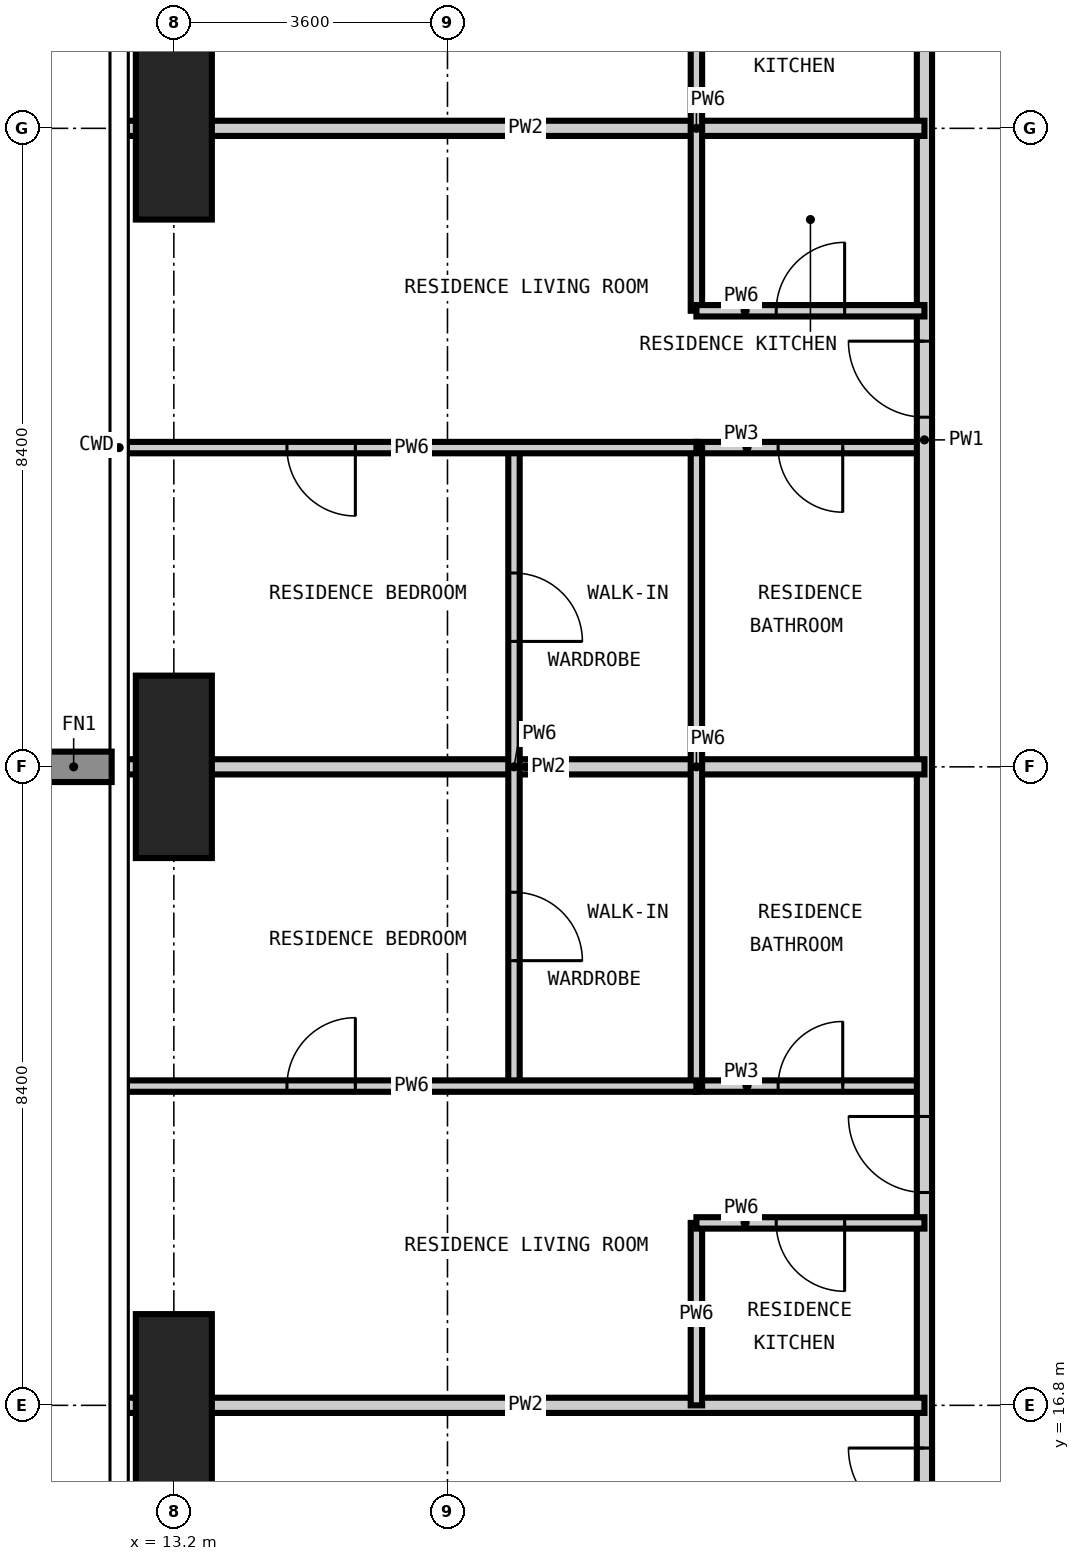
"""IFC4 building model, lengths in metres.
Left out: names, types, materials, properties, quantities, classifications, styles, units other than length and angle.
Written with IfcOpenShell. Run it as: python <this file> out.ifc"""

import sys

from ifc_helpers import new_model, si_unit, direction, frame, frame_2d, origin, origin_2d, place, context, subcontext, project, spatial, rectangle, extrude, element, fill, save


model = new_model("IFC4")
c1 = context("Model", 3, precision=1e-05, world=origin(), true_north=direction((0.0, 1.0)))
c2 = subcontext(c1, "Body", "Model", "MODEL_VIEW")
j1 = project(units=[si_unit("LENGTHUNIT", "METRE"), si_unit("PLANEANGLEUNIT", "RADIAN")], contexts=[c1])
p1 = place(None, origin())
s1 = spatial("IfcSite", under=j1, at=p1, CompositionType="ELEMENT")
p2 = place(p1, origin())
s2 = spatial("IfcBuilding", under=s1, at=p2, CompositionType="ELEMENT")
p3 = place(p2, frame((0.0, 0.0, 252.9)))
s3 = spatial("IfcBuildingStorey", under=s2, at=p3, CompositionType="ELEMENT", Elevation=252.9)
for number, where, z_axis, x_axis in (
    (1, (13.2, 16.8, -0.35), (0.0, 0.0, 1.0), (1.0, 0.0, 0.0)),
    (2, (13.2, 25.2, -0.35), (0.0, 0.0, 1.0), (1.0, 0.0, 0.0)),
    (3, (13.2, 33.6, -0.35), (0.0, 0.0, 1.0), (1.0, 0.0, 0.0)),
):
    element("IfcColumn", number, at=place(p3, frame(where, z_axis=z_axis, x_axis=x_axis)), inside=s3, PredefinedType="COLUMN", context=c2, shape_type="SweptSolid", body=[
        extrude(rectangle(XDim=1.0, YDim=2.4, at=origin_2d()), origin(), (0.0, 0.0, 1.0), 3.9),
    ])
p4 = place(p3, frame((20.075, 21.0, 0.0), z_axis=(0.0, 0.0, 1.0), x_axis=(1.0, 0.0, 0.0)))
e4 = element("IfcWall", 4, at=p4, inside=s3, PredefinedType="PARTITIONING", context=c2, shape_type="SweptSolid", body=[
    extrude(rectangle(XDim=3.0, YDim=0.15, at=frame_2d((1.5, 0.0))), origin(), (0.0, 0.0, 1.0), 3.55),
])
p5 = place(p4, frame((1.075, 0.0, 0.0)))
e5 = element("IfcOpeningElement", 5, at=p5, cuts=e4, PredefinedType="OPENING", context=c2, shape_type="SweptSolid", body=[
    extrude(rectangle(XDim=0.85, YDim=2.1, at=frame_2d((0.425, 1.05))), frame((0.0, 0.085, 0.0), z_axis=(0.0, -1.0, 0.0), x_axis=(1.0, 0.0, 0.0)), (0.0, 0.0, 1.0), 0.17),
])
p6 = place(p3, frame((20.075, 29.4, 0.0), z_axis=(0.0, 0.0, 1.0), x_axis=(1.0, 0.0, 0.0)))
e6 = element("IfcWall", 6, at=p6, inside=s3, PredefinedType="PARTITIONING", context=c2, shape_type="SweptSolid", body=[
    extrude(rectangle(XDim=3.0, YDim=0.15, at=frame_2d((1.5, 0.0))), origin(), (0.0, 0.0, 1.0), 3.55),
])
p7 = place(p6, frame((1.075, 0.0, 0.0)))
e7 = element("IfcOpeningElement", 7, at=p7, cuts=e6, PredefinedType="OPENING", context=c2, shape_type="SweptSolid", body=[
    extrude(rectangle(XDim=0.85, YDim=2.1, at=frame_2d((0.425, 1.05))), frame((0.0, 0.085, 0.0), z_axis=(0.0, -1.0, 0.0), x_axis=(1.0, 0.0, 0.0)), (0.0, 0.0, 1.0), 0.17),
])
p8 = place(p3, frame((23.075, 14.675, 0.0), z_axis=(0.0, 0.0, 1.0), x_axis=(0.0, 1.0, 0.0)))
e8 = element("IfcWall", 8, at=p8, inside=s3, PredefinedType="PARTITIONING", context=c2, shape_type="SweptSolid", body=[
    extrude(rectangle(XDim=30.65, YDim=0.2, at=frame_2d((15.325, 0.0))), origin(), (0.0, 0.0, 1.0), 3.55),
])
p9 = place(p8, frame((4.925, 0.0, 0.0)))
e9 = element("IfcOpeningElement", 9, at=p9, cuts=e8, PredefinedType="OPENING", context=c2, shape_type="SweptSolid", body=[
    extrude(rectangle(XDim=1.0, YDim=2.2, at=frame_2d((0.5, 1.1))), frame((0.0, 0.11, 0.0), z_axis=(0.0, -1.0, 0.0), x_axis=(1.0, 0.0, 0.0)), (0.0, 0.0, 1.0), 0.22),
])
p10 = place(p8, frame((15.125, 0.0, 0.0)))
e10 = element("IfcOpeningElement", 10, at=p10, cuts=e8, PredefinedType="OPENING", context=c2, shape_type="SweptSolid", body=[
    extrude(rectangle(XDim=1.0, YDim=2.2, at=frame_2d((0.5, 1.1))), frame((0.0, 0.11, 0.0), z_axis=(0.0, -1.0, 0.0), x_axis=(1.0, 0.0, 0.0)), (0.0, 0.0, 1.0), 0.22),
])
p11 = place(p8, frame((21.725, 0.0, 0.0)))
e11 = element("IfcOpeningElement", 11, at=p11, cuts=e8, PredefinedType="OPENING", context=c2, shape_type="SweptSolid", body=[
    extrude(rectangle(XDim=1.0, YDim=2.2, at=frame_2d((0.5, 1.1))), frame((0.0, 0.11, 0.0), z_axis=(0.0, -1.0, 0.0), x_axis=(1.0, 0.0, 0.0)), (0.0, 0.0, 1.0), 0.22),
])
p12 = place(p8, frame((0.563, 0.0, 0.0)))
e12 = element("IfcOpeningElement", 12, at=p12, cuts=e8, PredefinedType="OPENING", context=c2, shape_type="SweptSolid", body=[
    extrude(rectangle(XDim=1.0, YDim=2.2, at=frame_2d((0.5, 1.1))), frame((0.0, 0.11, 0.0), z_axis=(0.0, -1.0, 0.0), x_axis=(1.0, 0.0, 0.0)), (0.0, 0.0, 1.0), 0.22),
])
p13 = place(p8, frame((28.488, 0.0, 0.0)))
e13 = element("IfcOpeningElement", 13, at=p13, cuts=e8, PredefinedType="OPENING", context=c2, shape_type="SweptSolid", body=[
    extrude(rectangle(XDim=1.0, YDim=2.2, at=frame_2d((0.5, 1.1))), frame((0.0, 0.11, 0.0), z_axis=(0.0, -1.0, 0.0), x_axis=(1.0, 0.0, 0.0)), (0.0, 0.0, 1.0), 0.22),
])
for number, where, z_axis, x_axis in (
    (14, (12.582, 16.8, 0.0), (0.0, 0.0, 1.0), (1.0, 0.0, 0.0)),
    (15, (12.582, 25.2, 0.0), (0.0, 0.0, 1.0), (1.0, 0.0, 0.0)),
    (16, (12.582, 33.6, 0.0), (0.0, 0.0, 1.0), (1.0, 0.0, 0.0)),
):
    element("IfcWall", number, at=place(p3, frame(where, z_axis=z_axis, x_axis=x_axis)), inside=s3, PredefinedType="PARTITIONING", context=c2, shape_type="SweptSolid", body=[
        extrude(rectangle(XDim=10.493, YDim=0.2, at=frame_2d((5.247, 0.0))), origin(), (0.0, 0.0, 1.0), 3.55),
    ])
p14 = place(p3, frame((17.675, 21.0, 0.0), z_axis=(0.0, 0.0, 1.0), x_axis=(0.0, 1.0, 0.0)))
e17 = element("IfcWall", 17, at=p14, inside=s3, PredefinedType="PARTITIONING", context=c2, shape_type="SweptSolid", body=[
    extrude(rectangle(XDim=8.4, YDim=0.15, at=frame_2d((4.2, 0.0))), origin(), (0.0, 0.0, 1.0), 3.55),
])
p15 = place(p14, frame((1.65, 0.0, 0.0)))
e18 = element("IfcOpeningElement", 18, at=p15, cuts=e17, PredefinedType="OPENING", context=c2, shape_type="SweptSolid", body=[
    extrude(rectangle(XDim=0.9, YDim=2.1, at=frame_2d((0.45, 1.05))), frame((0.0, 0.085, 0.0), z_axis=(0.0, -1.0, 0.0), x_axis=(1.0, 0.0, 0.0)), (0.0, 0.0, 1.0), 0.17),
])
p16 = place(p14, frame((5.85, 0.0, 0.0)))
e19 = element("IfcOpeningElement", 19, at=p16, cuts=e17, PredefinedType="OPENING", context=c2, shape_type="SweptSolid", body=[
    extrude(rectangle(XDim=0.9, YDim=2.1, at=frame_2d((0.45, 1.05))), frame((0.0, 0.085, 0.0), z_axis=(0.0, -1.0, 0.0), x_axis=(1.0, 0.0, 0.0)), (0.0, 0.0, 1.0), 0.17),
])
p17 = place(p3, frame((20.075, 16.8, 0.0), z_axis=(0.0, 0.0, 1.0), x_axis=(0.0, 1.0, 0.0)))
e20 = element("IfcWall", 20, at=p17, inside=s3, PredefinedType="PARTITIONING", context=c2, shape_type="SweptSolid", body=[
    extrude(rectangle(XDim=2.4, YDim=0.15, at=frame_2d((1.2, 0.0))), origin(), (0.0, 0.0, 1.0), 3.55),
])
p18 = place(p3, frame((20.075, 21.0, 0.0), z_axis=(0.0, 0.0, 1.0), x_axis=(0.0, 1.0, 0.0)))
e21 = element("IfcWall", 21, at=p18, inside=s3, PredefinedType="PARTITIONING", context=c2, shape_type="SweptSolid", body=[
    extrude(rectangle(XDim=8.4, YDim=0.15, at=frame_2d((4.2, 0.0))), origin(), (0.0, 0.0, 1.0), 3.55),
])
p19 = place(p3, frame((20.075, 31.2, 0.0), z_axis=(0.0, 0.0, 1.0), x_axis=(0.0, 1.0, 0.0)))
e22 = element("IfcWall", 22, at=p19, inside=s3, PredefinedType="PARTITIONING", context=c2, shape_type="SweptSolid", body=[
    extrude(rectangle(XDim=4.8, YDim=0.15, at=frame_2d((2.4, 0.0))), origin(), (0.0, 0.0, 1.0), 3.55),
])
p20 = place(p3, frame((20.075, 19.2, 0.0), z_axis=(0.0, 0.0, 1.0), x_axis=(1.0, 0.0, 0.0)))
e23 = element("IfcWall", 23, at=p20, inside=s3, PredefinedType="PARTITIONING", context=c2, shape_type="SweptSolid", body=[
    extrude(rectangle(XDim=3.0, YDim=0.15, at=frame_2d((1.5, 0.0))), origin(), (0.0, 0.0, 1.0), 3.55),
])
p21 = place(p20, frame((1.05, 0.0, 0.0)))
e24 = element("IfcOpeningElement", 24, at=p21, cuts=e23, PredefinedType="OPENING", context=c2, shape_type="SweptSolid", body=[
    extrude(rectangle(XDim=0.9, YDim=2.1, at=frame_2d((0.45, 1.05))), frame((0.0, 0.085, 0.0), z_axis=(0.0, -1.0, 0.0), x_axis=(1.0, 0.0, 0.0)), (0.0, 0.0, 1.0), 0.17),
])
p22 = place(p3, frame((12.582, 21.0, 0.0), z_axis=(0.0, 0.0, 1.0), x_axis=(1.0, 0.0, 0.0)))
e25 = element("IfcWall", 25, at=p22, inside=s3, PredefinedType="PARTITIONING", context=c2, shape_type="SweptSolid", body=[
    extrude(rectangle(XDim=7.493, YDim=0.15, at=frame_2d((3.747, 0.0))), origin(), (0.0, 0.0, 1.0), 3.55),
])
p23 = place(p22, frame((2.106, 0.0, 0.0)))
e26 = element("IfcOpeningElement", 26, at=p23, cuts=e25, PredefinedType="OPENING", context=c2, shape_type="SweptSolid", body=[
    extrude(rectangle(XDim=0.9, YDim=2.1, at=frame_2d((0.45, 1.05))), frame((0.0, 0.085, 0.0), z_axis=(0.0, -1.0, 0.0), x_axis=(1.0, 0.0, 0.0)), (0.0, 0.0, 1.0), 0.17),
])
p24 = place(p3, frame((12.582, 29.4, 0.0), z_axis=(0.0, 0.0, 1.0), x_axis=(1.0, 0.0, 0.0)))
e27 = element("IfcWall", 27, at=p24, inside=s3, PredefinedType="PARTITIONING", context=c2, shape_type="SweptSolid", body=[
    extrude(rectangle(XDim=7.493, YDim=0.15, at=frame_2d((3.747, 0.0))), origin(), (0.0, 0.0, 1.0), 3.55),
])
p25 = place(p24, frame((2.106, 0.0, 0.0)))
e28 = element("IfcOpeningElement", 28, at=p25, cuts=e27, PredefinedType="OPENING", context=c2, shape_type="SweptSolid", body=[
    extrude(rectangle(XDim=0.9, YDim=2.1, at=frame_2d((0.45, 1.05))), frame((0.0, 0.085, 0.0), z_axis=(0.0, -1.0, 0.0), x_axis=(1.0, 0.0, 0.0)), (0.0, 0.0, 1.0), 0.17),
])
p26 = place(p3, frame((20.075, 31.2, 0.0), z_axis=(0.0, 0.0, 1.0), x_axis=(1.0, 0.0, 0.0)))
e29 = element("IfcWall", 29, at=p26, inside=s3, PredefinedType="PARTITIONING", context=c2, shape_type="SweptSolid", body=[
    extrude(rectangle(XDim=3.0, YDim=0.15, at=frame_2d((1.5, 0.0))), origin(), (0.0, 0.0, 1.0), 3.55),
])
p27 = place(p26, frame((1.05, 0.0, 0.0)))
e30 = element("IfcOpeningElement", 30, at=p27, cuts=e29, PredefinedType="OPENING", context=c2, shape_type="SweptSolid", body=[
    extrude(rectangle(XDim=0.9, YDim=2.1, at=frame_2d((0.45, 1.05))), frame((0.0, 0.085, 0.0), z_axis=(0.0, -1.0, 0.0), x_axis=(1.0, 0.0, 0.0)), (0.0, 0.0, 1.0), 0.17),
])
p28 = place(p9, origin())
e31 = element("IfcDoor", 31, at=p28, inside=s3, OperationType="SINGLE_SWING_RIGHT", PredefinedType="DOOR", context=c2, shape_type="SweptSolid", body=[
    extrude(rectangle(XDim=1.0, YDim=2.2, at=frame_2d((0.5, 1.1))), frame((0.0, 0.025, 0.0), z_axis=(0.0, -1.0, 0.0), x_axis=(1.0, 0.0, 0.0)), (0.0, 0.0, 1.0), 0.05),
])
fill(e9, e31)
p29 = place(p21, frame((0.9, 0.0, 0.0), z_axis=(0.0, 0.0, 1.0), x_axis=(-1.0, 0.0, 0.0)))
e32 = element("IfcDoor", 32, at=p29, inside=s3, OperationType="SINGLE_SWING_LEFT", PredefinedType="DOOR", context=c2, shape_type="SweptSolid", body=[
    extrude(rectangle(XDim=0.9, YDim=2.1, at=frame_2d((0.45, 1.05))), frame((0.0, 0.025, 0.0), z_axis=(0.0, -1.0, 0.0), x_axis=(1.0, 0.0, 0.0)), (0.0, 0.0, 1.0), 0.05),
])
fill(e24, e32)
p30 = place(p5, origin())
e33 = element("IfcDoor", 33, at=p30, inside=s3, OperationType="SINGLE_SWING_RIGHT", PredefinedType="DOOR", context=c2, shape_type="SweptSolid", body=[
    extrude(rectangle(XDim=0.85, YDim=2.1, at=frame_2d((0.425, 1.05))), frame((0.0, 0.025, 0.0), z_axis=(0.0, -1.0, 0.0), x_axis=(1.0, 0.0, 0.0)), (0.0, 0.0, 1.0), 0.05),
])
fill(e5, e33)
p31 = place(p15, frame((0.9, 0.0, 0.0), z_axis=(0.0, 0.0, 1.0), x_axis=(-1.0, 0.0, 0.0)))
e34 = element("IfcDoor", 34, at=p31, inside=s3, OperationType="SINGLE_SWING_RIGHT", PredefinedType="DOOR", context=c2, shape_type="SweptSolid", body=[
    extrude(rectangle(XDim=0.9, YDim=2.1, at=frame_2d((0.45, 1.05))), frame((0.0, 0.025, 0.0), z_axis=(0.0, -1.0, 0.0), x_axis=(1.0, 0.0, 0.0)), (0.0, 0.0, 1.0), 0.05),
])
fill(e18, e34)
p32 = place(p23, origin())
e35 = element("IfcDoor", 35, at=p32, inside=s3, OperationType="SINGLE_SWING_RIGHT", PredefinedType="DOOR", context=c2, shape_type="SweptSolid", body=[
    extrude(rectangle(XDim=0.9, YDim=2.1, at=frame_2d((0.45, 1.05))), frame((0.0, 0.025, 0.0), z_axis=(0.0, -1.0, 0.0), x_axis=(1.0, 0.0, 0.0)), (0.0, 0.0, 1.0), 0.05),
])
fill(e26, e35)
p33 = place(p10, origin())
e36 = element("IfcDoor", 36, at=p33, inside=s3, OperationType="SINGLE_SWING_RIGHT", PredefinedType="DOOR", context=c2, shape_type="SweptSolid", body=[
    extrude(rectangle(XDim=1.0, YDim=2.2, at=frame_2d((0.5, 1.1))), frame((0.0, 0.025, 0.0), z_axis=(0.0, -1.0, 0.0), x_axis=(1.0, 0.0, 0.0)), (0.0, 0.0, 1.0), 0.05),
])
fill(e10, e36)
p34 = place(p27, origin())
e37 = element("IfcDoor", 37, at=p34, inside=s3, OperationType="SINGLE_SWING_RIGHT", PredefinedType="DOOR", context=c2, shape_type="SweptSolid", body=[
    extrude(rectangle(XDim=0.9, YDim=2.1, at=frame_2d((0.45, 1.05))), frame((0.0, 0.025, 0.0), z_axis=(0.0, -1.0, 0.0), x_axis=(1.0, 0.0, 0.0)), (0.0, 0.0, 1.0), 0.05),
])
fill(e30, e37)
p35 = place(p7, frame((0.85, 0.0, 0.0), z_axis=(0.0, 0.0, 1.0), x_axis=(-1.0, 0.0, 0.0)))
e38 = element("IfcDoor", 38, at=p35, inside=s3, OperationType="SINGLE_SWING_LEFT", PredefinedType="DOOR", context=c2, shape_type="SweptSolid", body=[
    extrude(rectangle(XDim=0.85, YDim=2.1, at=frame_2d((0.425, 1.05))), frame((0.0, 0.025, 0.0), z_axis=(0.0, -1.0, 0.0), x_axis=(1.0, 0.0, 0.0)), (0.0, 0.0, 1.0), 0.05),
])
fill(e7, e38)
p36 = place(p16, frame((0.9, 0.0, 0.0), z_axis=(0.0, 0.0, 1.0), x_axis=(-1.0, 0.0, 0.0)))
e39 = element("IfcDoor", 39, at=p36, inside=s3, OperationType="SINGLE_SWING_RIGHT", PredefinedType="DOOR", context=c2, shape_type="SweptSolid", body=[
    extrude(rectangle(XDim=0.9, YDim=2.1, at=frame_2d((0.45, 1.05))), frame((0.0, 0.025, 0.0), z_axis=(0.0, -1.0, 0.0), x_axis=(1.0, 0.0, 0.0)), (0.0, 0.0, 1.0), 0.05),
])
fill(e19, e39)
p37 = place(p25, frame((0.9, 0.0, 0.0), z_axis=(0.0, 0.0, 1.0), x_axis=(-1.0, 0.0, 0.0)))
e40 = element("IfcDoor", 40, at=p37, inside=s3, OperationType="SINGLE_SWING_LEFT", PredefinedType="DOOR", context=c2, shape_type="SweptSolid", body=[
    extrude(rectangle(XDim=0.9, YDim=2.1, at=frame_2d((0.45, 1.05))), frame((0.0, 0.025, 0.0), z_axis=(0.0, -1.0, 0.0), x_axis=(1.0, 0.0, 0.0)), (0.0, 0.0, 1.0), 0.05),
])
fill(e28, e40)
p38 = place(p12, origin())
e41 = element("IfcDoor", 41, at=p38, inside=s3, OperationType="SINGLE_SWING_RIGHT", PredefinedType="DOOR", context=c2, shape_type="SweptSolid", body=[
    extrude(rectangle(XDim=1.0, YDim=2.2, at=frame_2d((0.5, 1.1))), frame((0.0, 0.025, 0.0), z_axis=(0.0, -1.0, 0.0), x_axis=(1.0, 0.0, 0.0)), (0.0, 0.0, 1.0), 0.05),
])
fill(e12, e41)
save(model, sys.argv[1])
